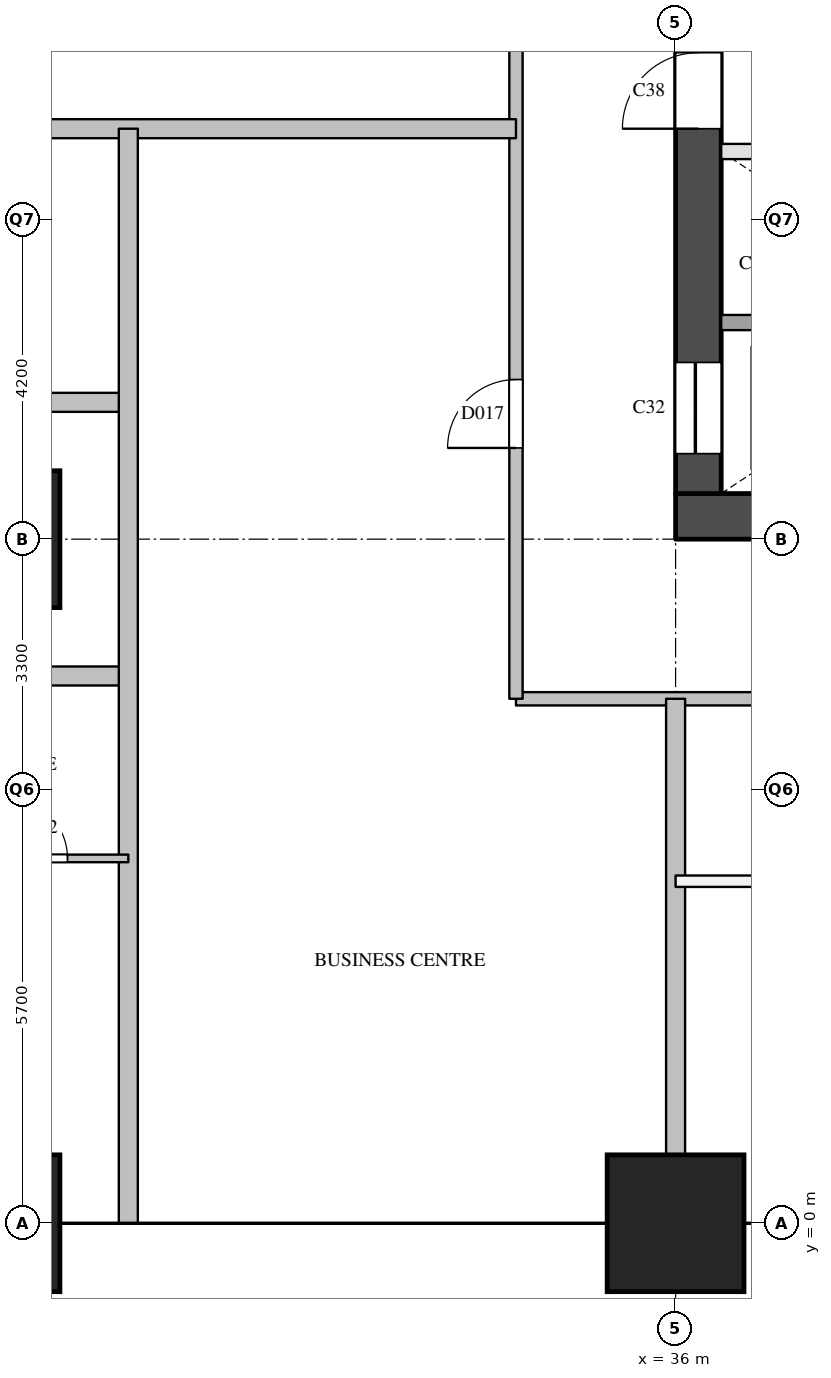
"""IFC4 building model, lengths in metres.
Left out: names, types, materials, properties, quantities, classifications, styles, units other than length and angle.
Written with IfcOpenShell. Run it as: python <this file> out.ifc"""

import sys

from ifc_helpers import new_model, si_unit, direction, frame, frame_2d, origin, origin_2d, place, context, subcontext, project, spatial, rectangle, extrude, element, fill, save


model = new_model("IFC4")
c1 = context("Model", 3, precision=1e-05, world=origin(), true_north=direction((0.0, 1.0)))
c2 = subcontext(c1, "Body", "Model", "MODEL_VIEW")
j1 = project(units=[si_unit("LENGTHUNIT", "METRE"), si_unit("PLANEANGLEUNIT", "RADIAN")], contexts=[c1])
p1 = place(None, origin())
s1 = spatial("IfcSite", under=j1, at=p1, CompositionType="ELEMENT")
p2 = place(p1, origin())
s2 = spatial("IfcBuilding", under=s1, at=p2, CompositionType="ELEMENT")
p3 = place(p2, frame((0.0, 0.0, 69.0)))
s3 = spatial("IfcBuildingStorey", under=s2, at=p3, CompositionType="ELEMENT", Elevation=69.0)
for number, where, z_axis, x_axis in (
    (1, (27.0, 0.0, 0.0), (0.0, 0.0, 1.0), (1.0, 0.0, 0.0)),
    (2, (27.0, 9.0, 0.0), (0.0, 0.0, 1.0), (1.0, 0.0, 0.0)),
    (3, (36.0, 0.0, 0.0), (0.0, 0.0, 1.0), (1.0, 0.0, 0.0)),
):
    element("IfcColumn", number, at=place(p3, frame(where, z_axis=z_axis, x_axis=x_axis)), inside=s3, PredefinedType="COLUMN", context=c2, shape_type="SweptSolid", body=[
        extrude(rectangle(XDim=1.8, YDim=1.8, at=origin_2d()), origin(), (0.0, 0.0, 1.0), 3.8),
    ])
p4 = place(p3, frame((36.0, 9.3, 0.0), z_axis=(0.0, 0.0, 1.0), x_axis=(1.0, 0.0, 0.0)))
e4 = element("IfcWall", 4, at=p4, inside=s3, PredefinedType="SHEAR", context=c2, shape_type="SweptSolid", body=[
    extrude(rectangle(XDim=9.0, YDim=0.6, at=frame_2d((4.5, 0.0))), origin(), (0.0, 0.0, 1.0), 3.5),
])
p5 = place(p3, frame((36.3, 9.6, 0.0), z_axis=(0.0, 0.0, 1.0), x_axis=(0.0, 1.0, 0.0)))
e5 = element("IfcWall", 5, at=p5, inside=s3, PredefinedType="SHEAR", context=c2, shape_type="SweptSolid", body=[
    extrude(rectangle(XDim=12.3, YDim=0.6, at=frame_2d((6.15, 0.0))), origin(), (0.0, 0.0, 1.0), 3.5),
])
p6 = place(p5, frame((0.525, 0.0, 0.0)))
e6 = element("IfcOpeningElement", 6, at=p6, cuts=e5, PredefinedType="OPENING", context=c2, shape_type="SweptSolid", body=[
    extrude(rectangle(XDim=1.2, YDim=2.1, at=frame_2d((0.6, 1.05))), frame((0.0, 0.31, 0.0), z_axis=(0.0, -1.0, 0.0), x_axis=(1.0, 0.0, 0.0)), (0.0, 0.0, 1.0), 0.62),
])
p7 = place(p5, frame((4.8, 0.0, 0.0)))
e7 = element("IfcOpeningElement", 7, at=p7, cuts=e5, PredefinedType="OPENING", context=c2, shape_type="SweptSolid", body=[
    extrude(rectangle(XDim=1.0, YDim=2.1, at=frame_2d((0.5, 1.05))), frame((0.0, 0.31, 0.0), z_axis=(0.0, -1.0, 0.0), x_axis=(1.0, 0.0, 0.0)), (0.0, 0.0, 1.0), 0.62),
])
p8 = place(p3, frame((36.6, 11.85, 0.0), z_axis=(0.0, 0.0, 1.0), x_axis=(1.0, 0.0, 0.0)))
e8 = element("IfcWall", 8, at=p8, inside=s3, PredefinedType="SOLIDWALL", context=c2, shape_type="SweptSolid", body=[
    extrude(rectangle(XDim=7.8, YDim=0.2, at=frame_2d((3.9, 0.0))), origin(), (0.0, 0.0, 1.0), 3.5),
])
p9 = place(p3, frame((36.6, 14.1, 0.0), z_axis=(0.0, 0.0, 1.0), x_axis=(1.0, 0.0, 0.0)))
e9 = element("IfcWall", 9, at=p9, inside=s3, PredefinedType="PARTITIONING", context=c2, shape_type="SweptSolid", body=[
    extrude(rectangle(XDim=6.0, YDim=0.2, at=frame_2d((3.0, 0.0))), origin(), (0.0, 0.0, 1.0), 3.5),
])
p10 = place(p9, frame((1.05, 0.0, 0.0)))
e10 = element("IfcOpeningElement", 10, at=p10, cuts=e9, PredefinedType="OPENING", context=c2, shape_type="SweptSolid", body=[
    extrude(rectangle(XDim=0.9, YDim=2.1, at=frame_2d((0.45, 1.05))), frame((0.0, 0.11, 0.0), z_axis=(0.0, -1.0, 0.0), x_axis=(1.0, 0.0, 0.0)), (0.0, 0.0, 1.0), 0.22),
])
p11 = place(p9, frame((4.05, 0.0, 0.0)))
e11 = element("IfcOpeningElement", 11, at=p11, cuts=e9, PredefinedType="OPENING", context=c2, shape_type="SweptSolid", body=[
    extrude(rectangle(XDim=0.9, YDim=2.1, at=frame_2d((0.45, 1.05))), frame((0.0, 0.11, 0.0), z_axis=(0.0, -1.0, 0.0), x_axis=(1.0, 0.0, 0.0)), (0.0, 0.0, 1.0), 0.22),
])
p12 = place(p3, frame((33.9, 6.9, 0.0), z_axis=(0.0, 0.0, 1.0), x_axis=(1.0, 0.0, 0.0)))
e12 = element("IfcWall", 12, at=p12, inside=s3, PredefinedType="PARTITIONING", context=c2, shape_type="SweptSolid", body=[
    extrude(rectangle(XDim=13.2, YDim=0.175, at=frame_2d((6.6, 0.0))), origin(), (0.0, 0.0, 1.0), 3.5),
])
p13 = place(p12, frame((4.0, 0.0, 0.0)))
e13 = element("IfcOpeningElement", 13, at=p13, cuts=e12, PredefinedType="OPENING", context=c2, shape_type="SweptSolid", body=[
    extrude(rectangle(XDim=1.0, YDim=2.1, at=frame_2d((0.5, 1.05))), frame((0.0, 0.097, 0.0), z_axis=(0.0, -1.0, 0.0), x_axis=(1.0, 0.0, 0.0)), (0.0, 0.0, 1.0), 0.195),
])
p14 = place(p3, frame((33.9, 6.9, 0.0), z_axis=(0.0, 0.0, 1.0), x_axis=(0.0, 1.0, 0.0)))
e14 = element("IfcWall", 14, at=p14, inside=s3, PredefinedType="PARTITIONING", context=c2, shape_type="SweptSolid", body=[
    extrude(rectangle(XDim=17.69, YDim=0.175, at=frame_2d((8.845, 0.0))), origin(), (0.0, 0.0, 1.0), 3.5),
])
p15 = place(p14, frame((3.3, 0.0, 0.0)))
e15 = element("IfcOpeningElement", 15, at=p15, cuts=e14, PredefinedType="OPENING", context=c2, shape_type="SweptSolid", body=[
    extrude(rectangle(XDim=0.9, YDim=2.1, at=frame_2d((0.45, 1.05))), frame((0.0, 0.097, 0.0), z_axis=(0.0, -1.0, 0.0), x_axis=(1.0, 0.0, 0.0)), (0.0, 0.0, 1.0), 0.195),
])
p16 = place(p14, frame((8.8, 0.0, 0.0)))
e16 = element("IfcOpeningElement", 16, at=p16, cuts=e14, PredefinedType="OPENING", context=c2, shape_type="SweptSolid", body=[
    extrude(rectangle(XDim=1.0, YDim=2.1, at=frame_2d((0.5, 1.05))), frame((0.0, 0.097, 0.0), z_axis=(0.0, -1.0, 0.0), x_axis=(1.0, 0.0, 0.0)), (0.0, 0.0, 1.0), 0.195),
])
p17 = place(p14, frame((12.4, 0.0, 0.0)))
e17 = element("IfcOpeningElement", 17, at=p17, cuts=e14, PredefinedType="OPENING", context=c2, shape_type="SweptSolid", body=[
    extrude(rectangle(XDim=1.0, YDim=2.1, at=frame_2d((0.5, 1.05))), frame((0.0, 0.097, 0.0), z_axis=(0.0, -1.0, 0.0), x_axis=(1.0, 0.0, 0.0)), (0.0, 0.0, 1.0), 0.195),
])
p18 = place(p3, frame((36.0, 4.5, 0.0), z_axis=(0.0, 0.0, 1.0), x_axis=(1.0, 0.0, 0.0)))
e18 = element("IfcWall", 18, at=p18, inside=s3, PredefinedType="PARTITIONING", context=c2, shape_type="SweptSolid", body=[
    extrude(rectangle(XDim=4.8, YDim=0.15, at=frame_2d((2.4, 0.0))), origin(), (0.0, 0.0, 1.0), 3.5),
])
p19 = place(p18, frame((1.95, 0.0, 0.0)))
e19 = element("IfcOpeningElement", 19, at=p19, cuts=e18, PredefinedType="OPENING", context=c2, shape_type="SweptSolid", body=[
    extrude(rectangle(XDim=0.9, YDim=2.1, at=frame_2d((0.45, 1.05))), frame((0.0, 0.085, 0.0), z_axis=(0.0, -1.0, 0.0), x_axis=(1.0, 0.0, 0.0)), (0.0, 0.0, 1.0), 0.17),
])
for number, where, z_axis, x_axis in (
    (20, (20.1, 7.2, 0.0), (0.0, 0.0, 1.0), (1.0, 0.0, 0.0)),
    (21, (20.1, 10.8, 0.0), (0.0, 0.0, 1.0), (1.0, 0.0, 0.0)),
):
    element("IfcWall", number, at=place(p3, frame(where, z_axis=z_axis, x_axis=x_axis)), inside=s3, PredefinedType="PARTITIONING", context=c2, shape_type="SweptSolid", body=[
        extrude(rectangle(XDim=8.7, YDim=0.25, at=frame_2d((4.35, 0.0))), origin(), (0.0, 0.0, 1.0), 2.5),
    ])
p20 = place(p3, frame((20.1, 14.4, 0.0), z_axis=(0.0, 0.0, 1.0), x_axis=(1.0, 0.0, 0.0)))
e22 = element("IfcWall", 22, at=p20, inside=s3, PredefinedType="PARTITIONING", context=c2, shape_type="SweptSolid", body=[
    extrude(rectangle(XDim=13.8, YDim=0.25, at=frame_2d((6.9, 0.0))), origin(), (0.0, 0.0, 1.0), 2.5),
])
p21 = place(p3, frame((28.8, 0.0, 0.0), z_axis=(0.0, 0.0, 1.0), x_axis=(0.0, 1.0, 0.0)))
e23 = element("IfcWall", 23, at=p21, inside=s3, PredefinedType="PARTITIONING", context=c2, shape_type="SweptSolid", body=[
    extrude(rectangle(XDim=14.4, YDim=0.25, at=frame_2d((7.2, 0.0))), origin(), (0.0, 0.0, 1.0), 2.5),
])
p22 = place(p3, frame((36.0, 0.0, 0.0), z_axis=(0.0, 0.0, 1.0), x_axis=(0.0, 1.0, 0.0)))
e24 = element("IfcWall", 24, at=p22, inside=s3, PredefinedType="PARTITIONING", context=c2, shape_type="SweptSolid", body=[
    extrude(rectangle(XDim=6.9, YDim=0.25, at=frame_2d((3.45, 0.0))), origin(), (0.0, 0.0, 1.0), 3.5),
])
p23 = place(p3, frame((26.4, 4.8, 0.0), z_axis=(0.0, 0.0, 1.0), x_axis=(1.0, 0.0, 0.0)))
e25 = element("IfcWall", 25, at=p23, inside=s3, PredefinedType="PARTITIONING", context=c2, shape_type="SweptSolid", body=[
    extrude(rectangle(XDim=2.4, YDim=0.1, at=frame_2d((1.2, 0.0))), origin(), (0.0, 0.0, 1.0), 2.5),
])
p24 = place(p23, frame((0.8, 0.0, 0.0)))
e26 = element("IfcOpeningElement", 26, at=p24, cuts=e25, PredefinedType="OPENING", context=c2, shape_type="SweptSolid", body=[
    extrude(rectangle(XDim=0.8, YDim=2.1, at=frame_2d((0.4, 1.05))), frame((0.0, 0.06, 0.0), z_axis=(0.0, -1.0, 0.0), x_axis=(1.0, 0.0, 0.0)), (0.0, 0.0, 1.0), 0.12),
])
p25 = place(p6, origin())
e27 = element("IfcDoor", 27, at=p25, inside=s3, OperationType="SLIDING_TO_LEFT", PredefinedType="DOOR", context=c2, shape_type="SweptSolid", body=[
    extrude(rectangle(XDim=1.2, YDim=2.1, at=frame_2d((0.6, 1.05))), frame((0.0, 0.025, 0.0), z_axis=(0.0, -1.0, 0.0), x_axis=(1.0, 0.0, 0.0)), (0.0, 0.0, 1.0), 0.05),
])
fill(e6, e27)
p26 = place(p7, origin())
e28 = element("IfcDoor", 28, at=p26, inside=s3, OperationType="SINGLE_SWING_LEFT", PredefinedType="DOOR", context=c2, shape_type="SweptSolid", body=[
    extrude(rectangle(XDim=1.0, YDim=2.1, at=frame_2d((0.5, 1.05))), frame((0.0, 0.025, 0.0), z_axis=(0.0, -1.0, 0.0), x_axis=(1.0, 0.0, 0.0)), (0.0, 0.0, 1.0), 0.05),
])
fill(e7, e28)
p27 = place(p24, origin())
e29 = element("IfcDoor", 29, at=p27, inside=s3, OperationType="SINGLE_SWING_LEFT", PredefinedType="DOOR", context=c2, shape_type="SweptSolid", body=[
    extrude(rectangle(XDim=0.8, YDim=2.1, at=frame_2d((0.4, 1.05))), frame((0.0, 0.025, 0.0), z_axis=(0.0, -1.0, 0.0), x_axis=(1.0, 0.0, 0.0)), (0.0, 0.0, 1.0), 0.05),
])
fill(e26, e29)
p28 = place(p15, origin())
e30 = element("IfcDoor", 30, at=p28, inside=s3, OperationType="SINGLE_SWING_LEFT", PredefinedType="DOOR", context=c2, shape_type="SweptSolid", body=[
    extrude(rectangle(XDim=0.9, YDim=2.1, at=frame_2d((0.45, 1.05))), frame((0.0, 0.025, 0.0), z_axis=(0.0, -1.0, 0.0), x_axis=(1.0, 0.0, 0.0)), (0.0, 0.0, 1.0), 0.05),
])
fill(e15, e30)
save(model, sys.argv[1])
